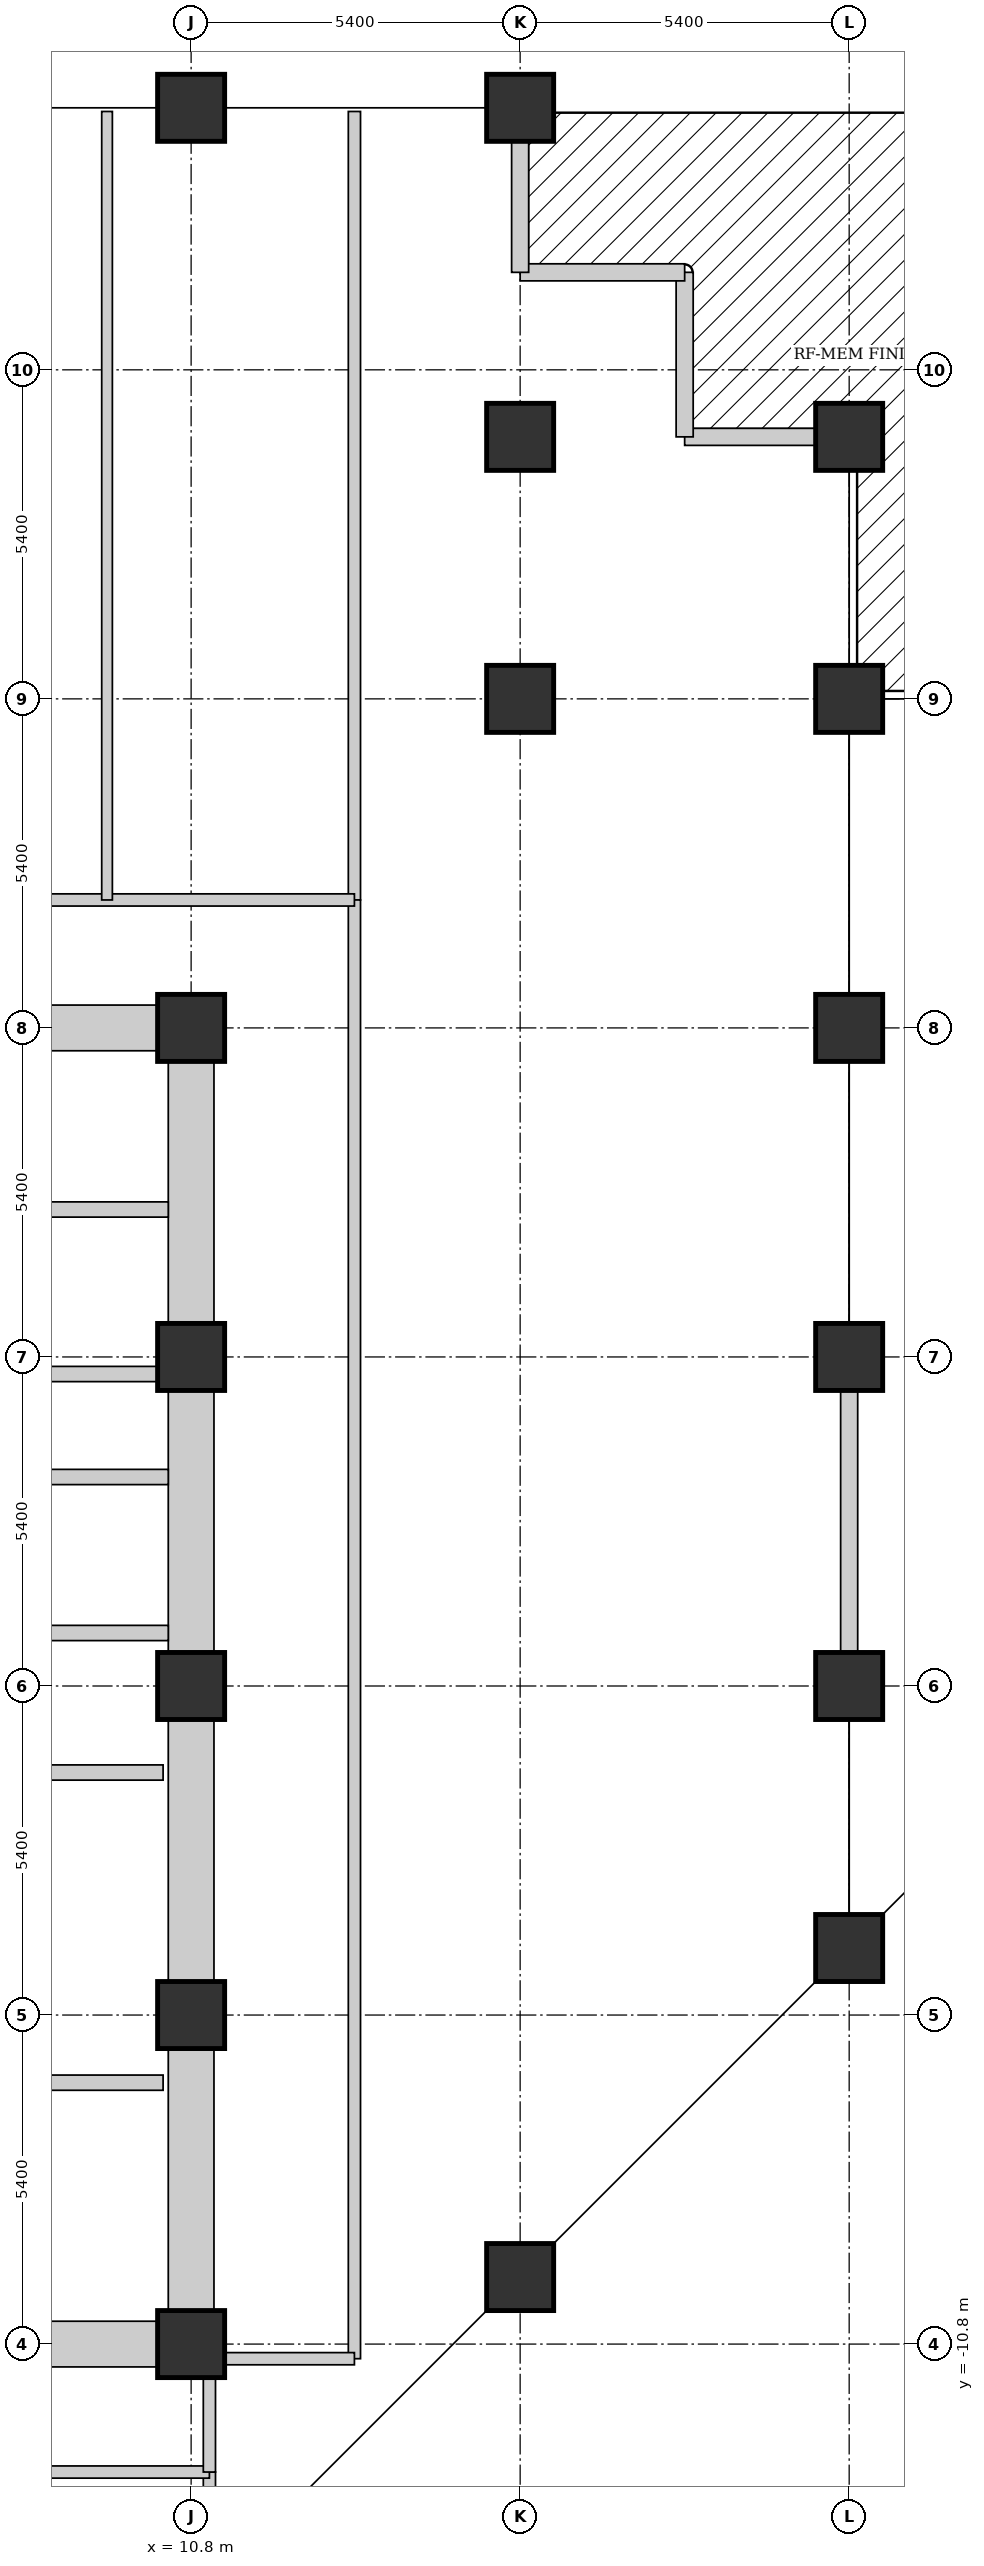
"""IFC4 building model, lengths in metres.
Left out: names, types, materials, properties, quantities, classifications, styles, units other than length and angle.
Written with IfcOpenShell. Run it as: python <this file> out.ifc"""

import sys

from ifc_helpers import new_model, si_unit, direction, frame, frame_2d, origin, origin_2d, place, context, subcontext, project, spatial, rectangle, extrude, element, fill, save


model = new_model("IFC4")
c1 = context("Model", 3, precision=1e-05, world=origin(), true_north=direction((0.0, 1.0)))
c2 = subcontext(c1, "Body", "Model", "MODEL_VIEW")
j1 = project(units=[si_unit("LENGTHUNIT", "METRE"), si_unit("PLANEANGLEUNIT", "RADIAN")], contexts=[c1])
p1 = place(None, origin())
s1 = spatial("IfcSite", under=j1, at=p1, CompositionType="ELEMENT")
p2 = place(p1, origin())
s2 = spatial("IfcBuilding", under=s1, at=p2, CompositionType="ELEMENT")
p3 = place(p2, frame((0.0, 0.0, 83.25)))
s3 = spatial("IfcBuildingStorey", under=s2, at=p3, CompositionType="ELEMENT", Elevation=83.25)
for number, where, z_axis, x_axis in (
    (1, (10.8, -10.8, 0.0), (0.0, 0.0, 1.0), (1.0, 0.0, 0.0)),
    (2, (10.8, -5.4, 0.0), (0.0, 0.0, 1.0), (1.0, 0.0, 0.0)),
    (3, (10.8, 0.0, 0.0), (0.0, 0.0, 1.0), (1.0, 0.0, 0.0)),
    (4, (10.8, 5.4, 0.0), (0.0, 0.0, 1.0), (1.0, 0.0, 0.0)),
    (5, (10.8, 10.8, 0.0), (0.0, 0.0, 1.0), (1.0, 0.0, 0.0)),
    (6, (10.8, 25.9, 0.0), (0.0, 0.0, 1.0), (1.0, 0.0, 0.0)),
    (7, (16.2, -9.7, 0.0), (0.0, 0.0, 1.0), (1.0, 0.0, 0.0)),
    (8, (16.2, 16.2, 0.0), (0.0, 0.0, 1.0), (1.0, 0.0, 0.0)),
    (9, (16.2, 20.5, 0.0), (0.0, 0.0, 1.0), (1.0, 0.0, 0.0)),
    (10, (16.2, 25.9, 0.0), (0.0, 0.0, 1.0), (1.0, 0.0, 0.0)),
    (11, (21.6, -4.3, 0.0), (0.0, 0.0, 1.0), (1.0, 0.0, 0.0)),
    (12, (21.6, 0.0, 0.0), (0.0, 0.0, 1.0), (1.0, 0.0, 0.0)),
    (13, (21.6, 5.4, 0.0), (0.0, 0.0, 1.0), (1.0, 0.0, 0.0)),
    (14, (21.6, 10.8, 0.0), (0.0, 0.0, 1.0), (1.0, 0.0, 0.0)),
    (15, (21.6, 16.2, 0.0), (0.0, 0.0, 1.0), (1.0, 0.0, 0.0)),
    (16, (21.6, 20.5, 0.0), (0.0, 0.0, 1.0), (1.0, 0.0, 0.0)),
):
    element("IfcColumn", number, at=place(p3, frame(where, z_axis=z_axis, x_axis=x_axis)), inside=s3, PredefinedType="COLUMN", context=c2, shape_type="SweptSolid", body=[
        extrude(rectangle(XDim=1.1, YDim=1.1, at=origin_2d()), origin(), (0.0, 0.0, 1.0), 3.75),
    ])
p4 = place(p3, frame((10.8, -10.24, 0.0), z_axis=(0.0, 0.0, 1.0), x_axis=(0.0, 1.0, 0.0)))
e17 = element("IfcWall", 17, at=p4, inside=s3, PredefinedType="SHEAR", context=c2, shape_type="SweptSolid", body=[
    extrude(rectangle(XDim=4.28, YDim=0.75, at=frame_2d((2.14, 0.0))), origin(), (0.0, 0.0, 1.0), 3.75),
])
p5 = place(p3, frame((10.8, -4.84, 0.0), z_axis=(0.0, 0.0, 1.0), x_axis=(0.0, 1.0, 0.0)))
e18 = element("IfcWall", 18, at=p5, inside=s3, PredefinedType="SHEAR", context=c2, shape_type="SweptSolid", body=[
    extrude(rectangle(XDim=4.28, YDim=0.75, at=frame_2d((2.14, 0.0))), origin(), (0.0, 0.0, 1.0), 3.75),
])
p6 = place(p5, frame((1.59, 0.0, 0.0)))
e19 = element("IfcOpeningElement", 19, at=p6, cuts=e18, PredefinedType="OPENING", context=c2, shape_type="SweptSolid", body=[
    extrude(rectangle(XDim=1.1, YDim=2.1, at=frame_2d((0.55, 1.05))), frame((0.0, 0.385, 0.0), z_axis=(0.0, -1.0, 0.0), x_axis=(1.0, 0.0, 0.0)), (0.0, 0.0, 1.0), 0.77),
])
p7 = place(p3, frame((10.8, 0.56, 0.0), z_axis=(0.0, 0.0, 1.0), x_axis=(0.0, 1.0, 0.0)))
e20 = element("IfcWall", 20, at=p7, inside=s3, PredefinedType="SHEAR", context=c2, shape_type="SweptSolid", body=[
    extrude(rectangle(XDim=4.28, YDim=0.75, at=frame_2d((2.14, 0.0))), origin(), (0.0, 0.0, 1.0), 3.75),
])
p8 = place(p7, frame((1.59, 0.0, 0.0)))
e21 = element("IfcOpeningElement", 21, at=p8, cuts=e20, PredefinedType="OPENING", context=c2, shape_type="SweptSolid", body=[
    extrude(rectangle(XDim=1.1, YDim=2.1, at=frame_2d((0.55, 1.05))), frame((0.0, 0.385, 0.0), z_axis=(0.0, -1.0, 0.0), x_axis=(1.0, 0.0, 0.0)), (0.0, 0.0, 1.0), 0.77),
])
for number, where, z_axis, x_axis in (
    (22, (5.96, -10.8, 0.0), (0.0, 0.0, 1.0), (1.0, 0.0, 0.0)),
    (23, (5.96, 10.8, 0.0), (0.0, 0.0, 1.0), (1.0, 0.0, 0.0)),
    (24, (10.8, 5.96, 0.0), (0.0, 0.0, 1.0), (0.0, 1.0, 0.0)),
):
    element("IfcWall", number, at=place(p3, frame(where, z_axis=z_axis, x_axis=x_axis)), inside=s3, PredefinedType="SHEAR", context=c2, shape_type="SweptSolid", body=[
        extrude(rectangle(XDim=4.28, YDim=0.75, at=frame_2d((2.14, 0.0))), origin(), (0.0, 0.0, 1.0), 3.75),
    ])
p9 = place(p3, frame((21.6, 4.852, 0.0), z_axis=(0.0, 0.0, 1.0), x_axis=(0.0, -1.0, 0.0)))
e25 = element("IfcWall", 25, at=p9, inside=s3, PredefinedType="STANDARD", context=c2, shape_type="SweptSolid", body=[
    extrude(rectangle(XDim=4.304, YDim=0.28, at=frame_2d((2.152, 0.0))), origin(), (0.0, 0.0, 1.0), 2.699),
])
p10 = place(p9, frame((1.352, 0.0, 0.0)))
e26 = element("IfcOpeningElement", 26, at=p10, cuts=e25, PredefinedType="OPENING", context=c2, shape_type="SweptSolid", body=[
    extrude(rectangle(XDim=1.6, YDim=2.25, at=frame_2d((0.8, 1.125))), frame((0.0, 0.15, 0.0), z_axis=(0.0, -1.0, 0.0), x_axis=(1.0, 0.0, 0.0)), (0.0, 0.0, 1.0), 0.3),
])
p11 = place(p3, frame((21.052, 20.5, 0.0), z_axis=(0.0, 0.0, 1.0), x_axis=(-1.0, 0.0, 0.0)))
e27 = element("IfcWall", 27, at=p11, inside=s3, PredefinedType="STANDARD", context=c2, shape_type="SweptSolid", body=[
    extrude(rectangle(XDim=2.152, YDim=0.28, at=frame_2d((1.076, 0.0))), origin(), (0.0, 0.0, 1.0), 2.933),
])
p12 = place(p3, frame((18.9, 20.5, 0.0), z_axis=(0.0, 0.0, 1.0), x_axis=(0.0, 1.0, 0.0)))
e28 = element("IfcWall", 28, at=p12, inside=s3, PredefinedType="STANDARD", context=c2, shape_type="SweptSolid", body=[
    extrude(rectangle(XDim=2.7, YDim=0.28, at=frame_2d((1.35, 0.0))), origin(), (0.0, 0.0, 1.0), 2.933),
])
p13 = place(p3, frame((18.9, 23.2, 0.0), z_axis=(0.0, 0.0, 1.0), x_axis=(-1.0, 0.0, 0.0)))
e29 = element("IfcWall", 29, at=p13, inside=s3, PredefinedType="STANDARD", context=c2, shape_type="SweptSolid", body=[
    extrude(rectangle(XDim=2.7, YDim=0.28, at=frame_2d((1.35, 0.0))), origin(), (0.0, 0.0, 1.0), 2.933),
])
p14 = place(p13, frame((0.775, 0.0, 0.65)))
e30 = element("IfcOpeningElement", 30, at=p14, cuts=e29, PredefinedType="OPENING", context=c2, shape_type="SweptSolid", body=[
    extrude(rectangle(XDim=1.15, YDim=1.55, at=frame_2d((0.575, 0.775))), frame((0.0, 0.15, 0.0), z_axis=(0.0, -1.0, 0.0), x_axis=(1.0, 0.0, 0.0)), (0.0, 0.0, 1.0), 0.3),
])
p15 = place(p3, frame((16.2, 23.2, 0.0), z_axis=(0.0, 0.0, 1.0), x_axis=(0.0, 1.0, 0.0)))
e31 = element("IfcWall", 31, at=p15, inside=s3, PredefinedType="STANDARD", context=c2, shape_type="SweptSolid", body=[
    extrude(rectangle(XDim=2.152, YDim=0.28, at=frame_2d((1.076, 0.0))), origin(), (0.0, 0.0, 1.0), 2.933),
])
p16 = place(p3, frame((5.44, -1.42, 0.0), z_axis=(0.0, 0.0, 1.0), x_axis=(1.0, 0.0, 0.0)))
e32 = element("IfcWall", 32, at=p16, inside=s3, PredefinedType="SHEAR", context=c2, shape_type="SweptSolid", body=[
    extrude(rectangle(XDim=4.9, YDim=0.25, at=frame_2d((2.45, 0.0))), origin(), (0.0, 0.0, 1.0), 3.75),
])
p17 = place(p3, frame((0.35, 7.82, 0.0), z_axis=(0.0, 0.0, 1.0), x_axis=(1.0, 0.0, 0.0)))
e33 = element("IfcWall", 33, at=p17, inside=s3, PredefinedType="SHEAR", context=c2, shape_type="SweptSolid", body=[
    extrude(rectangle(XDim=10.075, YDim=0.25, at=frame_2d((5.038, 0.0))), origin(), (0.0, 0.0, 1.0), 3.75),
])
p18 = place(p17, frame((0.7, 0.0, 0.0)))
e34 = element("IfcOpeningElement", 34, at=p18, cuts=e33, PredefinedType="OPENING", context=c2, shape_type="SweptSolid", body=[
    extrude(rectangle(XDim=1.1, YDim=2.1, at=frame_2d((0.55, 1.05))), frame((0.0, 0.135, 0.0), z_axis=(0.0, -1.0, 0.0), x_axis=(1.0, 0.0, 0.0)), (0.0, 0.0, 1.0), 0.27),
])
p19 = place(p17, frame((3.2, 0.0, 0.0)))
e35 = element("IfcOpeningElement", 35, at=p19, cuts=e33, PredefinedType="OPENING", context=c2, shape_type="SweptSolid", body=[
    extrude(rectangle(XDim=1.1, YDim=2.1, at=frame_2d((0.55, 1.05))), frame((0.0, 0.135, 0.0), z_axis=(0.0, -1.0, 0.0), x_axis=(1.0, 0.0, 0.0)), (0.0, 0.0, 1.0), 0.27),
])
p20 = place(p17, frame((5.7, 0.0, 0.0)))
e36 = element("IfcOpeningElement", 36, at=p20, cuts=e33, PredefinedType="OPENING", context=c2, shape_type="SweptSolid", body=[
    extrude(rectangle(XDim=1.1, YDim=2.1, at=frame_2d((0.55, 1.05))), frame((0.0, 0.135, 0.0), z_axis=(0.0, -1.0, 0.0), x_axis=(1.0, 0.0, 0.0)), (0.0, 0.0, 1.0), 0.27),
])
p21 = place(p17, frame((8.2, 0.0, 0.0)))
e37 = element("IfcOpeningElement", 37, at=p21, cuts=e33, PredefinedType="OPENING", context=c2, shape_type="SweptSolid", body=[
    extrude(rectangle(XDim=1.1, YDim=2.1, at=frame_2d((0.55, 1.05))), frame((0.0, 0.135, 0.0), z_axis=(0.0, -1.0, 0.0), x_axis=(1.0, 0.0, 0.0)), (0.0, 0.0, 1.0), 0.27),
])
p22 = place(p3, frame((2.95, 5.12, 0.0), z_axis=(0.0, 0.0, 1.0), x_axis=(1.0, 0.0, 0.0)))
e38 = element("IfcWall", 38, at=p22, inside=s3, PredefinedType="SHEAR", context=c2, shape_type="SweptSolid", body=[
    extrude(rectangle(XDim=7.3, YDim=0.25, at=frame_2d((3.65, 0.0))), origin(), (0.0, 0.0, 1.0), 3.75),
])
for number, where, z_axis, x_axis in (
    (39, (5.55, 3.43, 0.0), (0.0, 0.0, 1.0), (1.0, 0.0, 0.0)),
    (40, (5.55, 0.87, 0.0), (0.0, 0.0, 1.0), (1.0, 0.0, 0.0)),
):
    element("IfcWall", number, at=place(p3, frame(where, z_axis=z_axis, x_axis=x_axis)), inside=s3, PredefinedType="SHEAR", context=c2, shape_type="SweptSolid", body=[
        extrude(rectangle(XDim=4.875, YDim=0.25, at=frame_2d((2.438, 0.0))), origin(), (0.0, 0.0, 1.0), 3.75),
    ])
p23 = place(p3, frame((2.64, -6.51, 0.0), z_axis=(0.0, 0.0, 1.0), x_axis=(1.0, 0.0, 0.0)))
e41 = element("IfcWall", 41, at=p23, inside=s3, PredefinedType="SHEAR", context=c2, shape_type="SweptSolid", body=[
    extrude(rectangle(XDim=7.7, YDim=0.25, at=frame_2d((3.85, 0.0))), origin(), (0.0, 0.0, 1.0), 3.75),
])
p24 = place(p23, frame((6.0, 0.0, 0.0)))
e42 = element("IfcOpeningElement", 42, at=p24, cuts=e41, PredefinedType="OPENING", context=c2, shape_type="SweptSolid", body=[
    extrude(rectangle(XDim=0.95, YDim=2.1, at=frame_2d((0.475, 1.05))), frame((0.0, 0.135, 0.0), z_axis=(0.0, -1.0, 0.0), x_axis=(1.0, 0.0, 0.0)), (0.0, 0.0, 1.0), 0.27),
])
p25 = place(p3, frame((13.48, 12.9, 0.0), z_axis=(0.0, 0.0, 1.0), x_axis=(0.0, 1.0, 0.0)))
e43 = element("IfcWall", 43, at=p25, inside=s3, PredefinedType="PARTITIONING", context=c2, shape_type="SweptSolid", body=[
    extrude(rectangle(XDim=12.94, YDim=0.2, at=frame_2d((6.47, 0.0))), origin(), (0.0, 0.0, 1.0), 2.699),
])
p26 = place(p3, frame((11.1, -14.715, 0.0), z_axis=(0.0, 0.0, 1.0), x_axis=(0.0, 1.0, 0.0)))
e44 = element("IfcWall", 44, at=p26, inside=s3, PredefinedType="PARTITIONING", context=c2, shape_type="SweptSolid", body=[
    extrude(rectangle(XDim=1.815, YDim=0.2, at=frame_2d((0.908, 0.0))), origin(), (0.0, 0.0, 1.0), 3.57),
])
p27 = place(p3, frame((13.48, -11.04, 0.0), z_axis=(0.0, 0.0, 1.0), x_axis=(0.0, 1.0, 0.0)))
e45 = element("IfcWall", 45, at=p27, inside=s3, PredefinedType="PARTITIONING", context=c2, shape_type="SweptSolid", body=[
    extrude(rectangle(XDim=23.94, YDim=0.2, at=frame_2d((11.97, 0.0))), origin(), (0.0, 0.0, 1.0), 2.933),
])
p28 = place(p27, frame((11.52, 0.0, 0.0)))
e46 = element("IfcOpeningElement", 46, at=p28, cuts=e45, PredefinedType="OPENING", context=c2, shape_type="SweptSolid", body=[
    extrude(rectangle(XDim=0.95, YDim=2.1, at=frame_2d((0.475, 1.05))), frame((0.0, 0.11, 0.0), z_axis=(0.0, -1.0, 0.0), x_axis=(1.0, 0.0, 0.0)), (0.0, 0.0, 1.0), 0.22),
])
p29 = place(p3, frame((10.85, -11.04, 0.0), z_axis=(0.0, 0.0, 1.0), x_axis=(1.0, 0.0, 0.0)))
e47 = element("IfcWall", 47, at=p29, inside=s3, PredefinedType="PARTITIONING", context=c2, shape_type="SweptSolid", body=[
    extrude(rectangle(XDim=2.63, YDim=0.2, at=frame_2d((1.315, 0.0))), origin(), (0.0, 0.0, 1.0), 3.57),
])
p30 = place(p3, frame((0.8, 12.9, 0.0), z_axis=(0.0, 0.0, 1.0), x_axis=(1.0, 0.0, 0.0)))
e48 = element("IfcWall", 48, at=p30, inside=s3, PredefinedType="PARTITIONING", context=c2, shape_type="SweptSolid", body=[
    extrude(rectangle(XDim=12.68, YDim=0.2, at=frame_2d((6.34, 0.0))), origin(), (0.0, 0.0, 1.0), 2.933),
])
p31 = place(p30, frame((1.705, 0.0, 0.0)))
e49 = element("IfcOpeningElement", 49, at=p31, cuts=e48, PredefinedType="OPENING", context=c2, shape_type="SweptSolid", body=[
    extrude(rectangle(XDim=0.85, YDim=2.1, at=frame_2d((0.425, 1.05))), frame((0.0, 0.11, 0.0), z_axis=(0.0, -1.0, 0.0), x_axis=(1.0, 0.0, 0.0)), (0.0, 0.0, 1.0), 0.22),
])
p32 = place(p30, frame((6.015, 0.0, 0.0)))
e50 = element("IfcOpeningElement", 50, at=p32, cuts=e48, PredefinedType="OPENING", context=c2, shape_type="SweptSolid", body=[
    extrude(rectangle(XDim=0.85, YDim=2.1, at=frame_2d((0.425, 1.05))), frame((0.0, 0.11, 0.0), z_axis=(0.0, -1.0, 0.0), x_axis=(1.0, 0.0, 0.0)), (0.0, 0.0, 1.0), 0.22),
])
p33 = place(p30, frame((11.55, 0.0, 0.0)))
e51 = element("IfcOpeningElement", 51, at=p33, cuts=e48, PredefinedType="OPENING", context=c2, shape_type="SweptSolid", body=[
    extrude(rectangle(XDim=0.85, YDim=2.1, at=frame_2d((0.425, 1.05))), frame((0.0, 0.11, 0.0), z_axis=(0.0, -1.0, 0.0), x_axis=(1.0, 0.0, 0.0)), (0.0, 0.0, 1.0), 0.22),
])
p34 = place(p3, frame((-13.48, -12.9, 0.0), z_axis=(0.0, 0.0, 1.0), x_axis=(1.0, 0.0, 0.0)))
e52 = element("IfcWall", 52, at=p34, inside=s3, PredefinedType="PARTITIONING", context=c2, shape_type="SweptSolid", body=[
    extrude(rectangle(XDim=24.58, YDim=0.2, at=frame_2d((12.29, 0.0))), origin(), (0.0, 0.0, 1.0), 2.933),
])
p35 = place(p34, frame((5.695, 0.0, 0.0)))
e53 = element("IfcOpeningElement", 53, at=p35, cuts=e52, PredefinedType="OPENING", context=c2, shape_type="SweptSolid", body=[
    extrude(rectangle(XDim=0.85, YDim=2.1, at=frame_2d((0.425, 1.05))), frame((0.0, 0.11, 0.0), z_axis=(0.0, -1.0, 0.0), x_axis=(1.0, 0.0, 0.0)), (0.0, 0.0, 1.0), 0.22),
])
p36 = place(p34, frame((15.794, 0.0, 0.0)))
e54 = element("IfcOpeningElement", 54, at=p36, cuts=e52, PredefinedType="OPENING", context=c2, shape_type="SweptSolid", body=[
    extrude(rectangle(XDim=0.85, YDim=2.1, at=frame_2d((0.425, 1.05))), frame((0.0, 0.11, 0.0), z_axis=(0.0, -1.0, 0.0), x_axis=(1.0, 0.0, 0.0)), (0.0, 0.0, 1.0), 0.22),
])
p37 = place(p3, frame((11.1, -12.9, 0.0), z_axis=(0.0, 0.0, 1.0), x_axis=(0.0, 1.0, 0.0)))
e55 = element("IfcWall", 55, at=p37, inside=s3, PredefinedType="PARTITIONING", context=c2, shape_type="SweptSolid", body=[
    extrude(rectangle(XDim=1.86, YDim=0.2, at=frame_2d((0.93, 0.0))), origin(), (0.0, 0.0, 1.0), 3.57),
])
p38 = place(p3, frame((9.42, 12.9, 0.0), z_axis=(0.0, 0.0, 1.0), x_axis=(0.0, 1.0, 0.0)))
e56 = element("IfcWall", 56, at=p38, inside=s3, PredefinedType="PARTITIONING", context=c2, shape_type="SweptSolid", body=[
    extrude(rectangle(XDim=12.94, YDim=0.175, at=frame_2d((6.47, 0.0))), origin(), (0.0, 0.0, 1.0), 2.699),
])
p39 = place(p10, origin())
e57 = element("IfcDoor", 57, at=p39, inside=s3, OperationType="DOUBLE_DOOR_SINGLE_SWING", PredefinedType="DOOR", context=c2, shape_type="SweptSolid", body=[
    extrude(rectangle(XDim=1.6, YDim=2.25, at=frame_2d((0.8, 1.125))), frame((0.0, 0.025, 0.0), z_axis=(0.0, -1.0, 0.0), x_axis=(1.0, 0.0, 0.0)), (0.0, 0.0, 1.0), 0.05),
])
fill(e26, e57)
p40 = place(p14, origin())
e58 = element("IfcWindow", 58, at=p40, inside=s3, PartitioningType="SINGLE_PANEL", PredefinedType="WINDOW", context=c2, shape_type="SweptSolid", body=[
    extrude(rectangle(XDim=1.15, YDim=1.55, at=frame_2d((0.575, 0.775))), frame((0.0, 0.03, 0.0), z_axis=(0.0, -1.0, 0.0), x_axis=(1.0, 0.0, 0.0)), (0.0, 0.0, 1.0), 0.06),
])
fill(e30, e58)
p41 = place(p24, origin())
e59 = element("IfcDoor", 59, at=p41, inside=s3, OperationType="SINGLE_SWING_RIGHT", PredefinedType="DOOR", context=c2, shape_type="SweptSolid", body=[
    extrude(rectangle(XDim=0.95, YDim=2.1, at=frame_2d((0.475, 1.05))), frame((0.0, 0.025, 0.0), z_axis=(0.0, -1.0, 0.0), x_axis=(1.0, 0.0, 0.0)), (0.0, 0.0, 1.0), 0.05),
])
fill(e42, e59)
p42 = place(p6, origin())
e60 = element("IfcDoor", 60, at=p42, inside=s3, OperationType="SINGLE_SWING_RIGHT", PredefinedType="DOOR", context=c2, shape_type="SweptSolid", body=[
    extrude(rectangle(XDim=1.1, YDim=2.1, at=frame_2d((0.55, 1.05))), frame((0.0, 0.025, 0.0), z_axis=(0.0, -1.0, 0.0), x_axis=(1.0, 0.0, 0.0)), (0.0, 0.0, 1.0), 0.05),
])
fill(e19, e60)
p43 = place(p21, origin())
e61 = element("IfcDoor", 61, at=p43, inside=s3, OperationType="SLIDING_TO_LEFT", PredefinedType="DOOR", context=c2, shape_type="SweptSolid", body=[
    extrude(rectangle(XDim=1.1, YDim=2.1, at=frame_2d((0.55, 1.05))), frame((0.0, 0.025, 0.0), z_axis=(0.0, -1.0, 0.0), x_axis=(1.0, 0.0, 0.0)), (0.0, 0.0, 1.0), 0.05),
])
fill(e37, e61)
p44 = place(p8, origin())
e62 = element("IfcDoor", 62, at=p44, inside=s3, OperationType="SINGLE_SWING_LEFT", PredefinedType="DOOR", context=c2, shape_type="SweptSolid", body=[
    extrude(rectangle(XDim=1.1, YDim=2.1, at=frame_2d((0.55, 1.05))), frame((0.0, 0.025, 0.0), z_axis=(0.0, -1.0, 0.0), x_axis=(1.0, 0.0, 0.0)), (0.0, 0.0, 1.0), 0.05),
])
fill(e21, e62)
p45 = place(p33, origin())
e63 = element("IfcDoor", 63, at=p45, inside=s3, OperationType="SINGLE_SWING_LEFT", PredefinedType="DOOR", context=c2, shape_type="SweptSolid", body=[
    extrude(rectangle(XDim=0.85, YDim=2.1, at=frame_2d((0.425, 1.05))), frame((0.0, 0.025, 0.0), z_axis=(0.0, -1.0, 0.0), x_axis=(1.0, 0.0, 0.0)), (0.0, 0.0, 1.0), 0.05),
])
fill(e51, e63)
p46 = place(p28, origin())
e64 = element("IfcDoor", 64, at=p46, inside=s3, OperationType="SINGLE_SWING_RIGHT", PredefinedType="DOOR", context=c2, shape_type="SweptSolid", body=[
    extrude(rectangle(XDim=0.95, YDim=2.1, at=frame_2d((0.475, 1.05))), frame((0.0, 0.025, 0.0), z_axis=(0.0, -1.0, 0.0), x_axis=(1.0, 0.0, 0.0)), (0.0, 0.0, 1.0), 0.05),
])
fill(e46, e64)
save(model, sys.argv[1])
